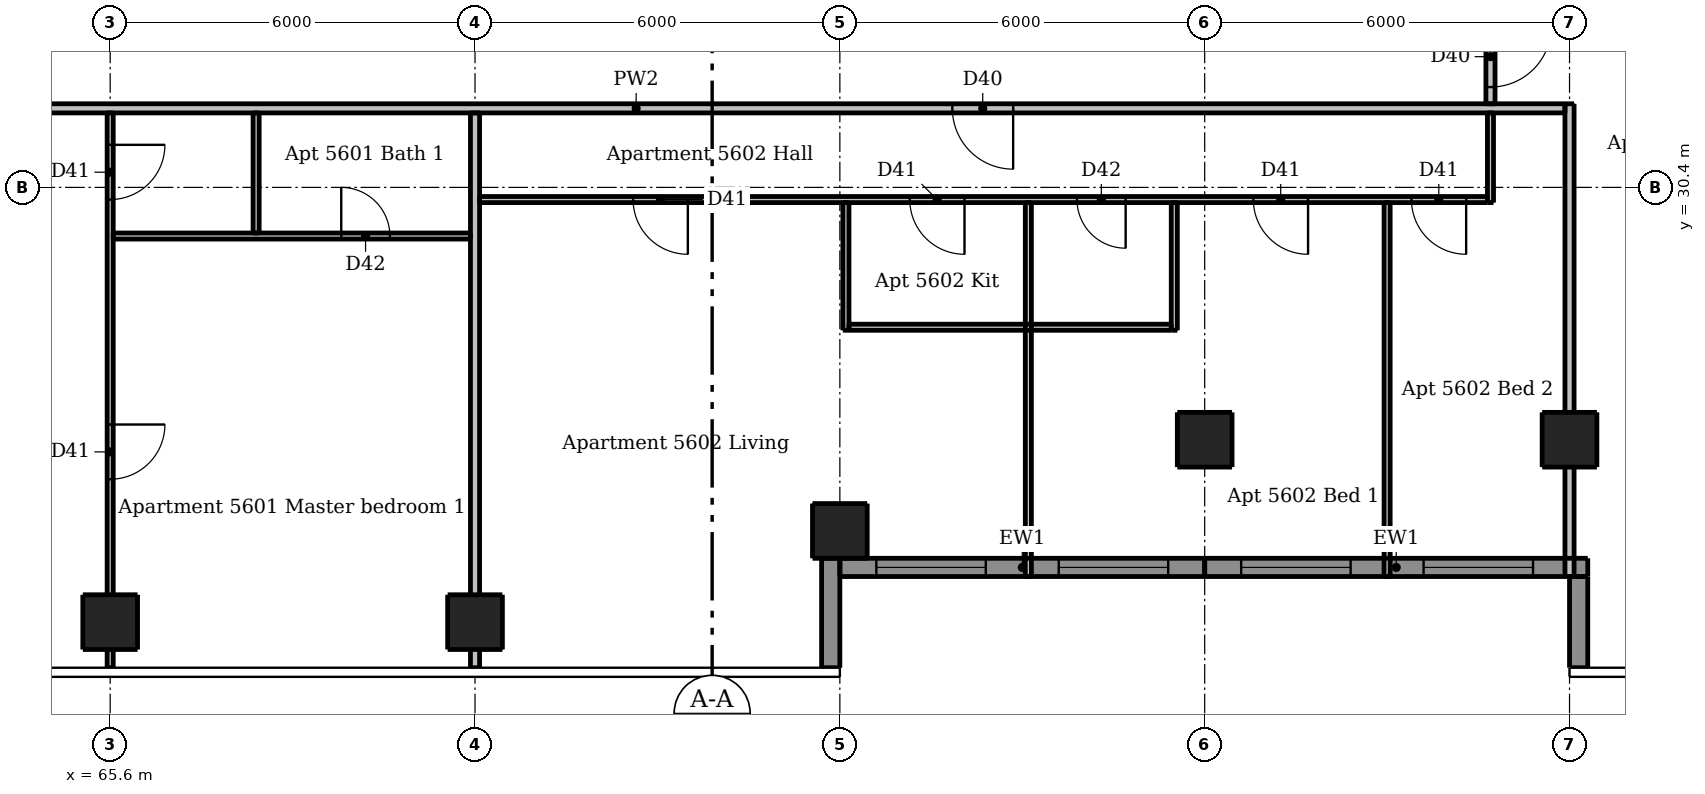
"""IFC4 building model, lengths in metres.
Left out: names, types, materials, properties, quantities, classifications, styles, units other than length and angle.
Written with IfcOpenShell. Run it as: python <this file> out.ifc"""

import sys

from ifc_helpers import new_model, si_unit, direction, frame, frame_2d, origin, origin_2d, place, context, subcontext, project, spatial, rectangle, extrude, element, fill, save


model = new_model("IFC4")
c1 = context("Model", 3, precision=1e-05, world=origin(), true_north=direction((0.0, 1.0)))
c2 = subcontext(c1, "Body", "Model", "MODEL_VIEW")
j1 = project(units=[si_unit("LENGTHUNIT", "METRE"), si_unit("PLANEANGLEUNIT", "RADIAN")], contexts=[c1])
p1 = place(None, origin())
s1 = spatial("IfcSite", under=j1, at=p1, CompositionType="ELEMENT")
p2 = place(p1, origin())
s2 = spatial("IfcBuilding", under=s1, at=p2, CompositionType="ELEMENT")
p3 = place(p2, frame((0.0, 0.0, 210.1)))
s3 = spatial("IfcBuildingStorey", under=s2, at=p3, CompositionType="ELEMENT", Elevation=210.1)
for number, where, z_axis, x_axis in (
    (1, (65.6, 23.25, 0.0), (0.0, 0.0, 1.0), (1.0, 0.0, 0.0)),
    (2, (71.6, 23.25, 0.0), (0.0, 0.0, 1.0), (1.0, 0.0, 0.0)),
    (3, (77.6, 24.75, 0.0), (0.0, 0.0, 1.0), (1.0, 0.0, 0.0)),
    (4, (83.6, 26.25, 0.0), (0.0, 0.0, 1.0), (1.0, 0.0, 0.0)),
    (5, (89.6, 26.25, 0.0), (0.0, 0.0, 1.0), (1.0, 0.0, 0.0)),
):
    element("IfcColumn", number, at=place(p3, frame(where, z_axis=z_axis, x_axis=x_axis)), inside=s3, PredefinedType="COLUMN", context=c2, shape_type="SweptSolid", body=[
        extrude(rectangle(XDim=0.9, YDim=0.9, at=origin_2d()), origin(), (0.0, 0.0, 1.0), 3.05),
    ])
p4 = place(p3, frame((77.45, 22.5, 0.0), z_axis=(0.0, 0.0, 1.0), x_axis=(0.0, 1.0, 0.0)))
e6 = element("IfcWall", 6, at=p4, inside=s3, PredefinedType="SOLIDWALL", context=c2, shape_type="SweptSolid", body=[
    extrude(rectangle(XDim=1.8, YDim=0.3, at=frame_2d((0.9, 0.0))), origin(), (0.0, 0.0, 1.0), 3.05),
])
p5 = place(p3, frame((89.75, 24.0, 0.0), z_axis=(0.0, 0.0, 1.0), x_axis=(0.0, -1.0, 0.0)))
e7 = element("IfcWall", 7, at=p5, inside=s3, PredefinedType="SOLIDWALL", context=c2, shape_type="SweptSolid", body=[
    extrude(rectangle(XDim=1.5, YDim=0.3, at=frame_2d((0.75, 0.0))), origin(), (0.0, 0.0, 1.0), 3.05),
])
p6 = place(p3, frame((77.6, 24.15, 0.0), z_axis=(0.0, 0.0, 1.0), x_axis=(1.0, 0.0, 0.0)))
e8 = element("IfcWall", 8, at=p6, inside=s3, PredefinedType="SOLIDWALL", context=c2, shape_type="SweptSolid", body=[
    extrude(rectangle(XDim=6.0, YDim=0.3, at=frame_2d((3.0, 0.0))), origin(), (0.0, 0.0, 1.0), 3.05),
])
p7 = place(p6, frame((0.6, 0.0, 0.15)))
e9 = element("IfcOpeningElement", 9, at=p7, cuts=e8, PredefinedType="OPENING", context=c2, shape_type="SweptSolid", body=[
    extrude(rectangle(XDim=1.8, YDim=2.1, at=frame_2d((0.9, 1.05))), frame((0.0, 0.16, 0.0), z_axis=(0.0, -1.0, 0.0), x_axis=(1.0, 0.0, 0.0)), (0.0, 0.0, 1.0), 0.32),
])
p8 = place(p6, frame((3.6, 0.0, 0.15)))
e10 = element("IfcOpeningElement", 10, at=p8, cuts=e8, PredefinedType="OPENING", context=c2, shape_type="SweptSolid", body=[
    extrude(rectangle(XDim=1.8, YDim=2.1, at=frame_2d((0.9, 1.05))), frame((0.0, 0.16, 0.0), z_axis=(0.0, -1.0, 0.0), x_axis=(1.0, 0.0, 0.0)), (0.0, 0.0, 1.0), 0.32),
])
p9 = place(p3, frame((83.6, 24.15, 0.0), z_axis=(0.0, 0.0, 1.0), x_axis=(1.0, 0.0, 0.0)))
e11 = element("IfcWall", 11, at=p9, inside=s3, PredefinedType="SOLIDWALL", context=c2, shape_type="SweptSolid", body=[
    extrude(rectangle(XDim=6.3, YDim=0.3, at=frame_2d((3.15, 0.0))), origin(), (0.0, 0.0, 1.0), 3.05),
])
p10 = place(p9, frame((0.6, 0.0, 0.15)))
e12 = element("IfcOpeningElement", 12, at=p10, cuts=e11, PredefinedType="OPENING", context=c2, shape_type="SweptSolid", body=[
    extrude(rectangle(XDim=1.8, YDim=2.1, at=frame_2d((0.9, 1.05))), frame((0.0, 0.16, 0.0), z_axis=(0.0, -1.0, 0.0), x_axis=(1.0, 0.0, 0.0)), (0.0, 0.0, 1.0), 0.32),
])
p11 = place(p9, frame((3.6, 0.0, 0.15)))
e13 = element("IfcOpeningElement", 13, at=p11, cuts=e11, PredefinedType="OPENING", context=c2, shape_type="SweptSolid", body=[
    extrude(rectangle(XDim=1.8, YDim=2.1, at=frame_2d((0.9, 1.05))), frame((0.0, 0.16, 0.0), z_axis=(0.0, -1.0, 0.0), x_axis=(1.0, 0.0, 0.0)), (0.0, 0.0, 1.0), 0.32),
])
p12 = place(p3, frame((65.6, 31.625, 0.0), z_axis=(0.0, 0.0, 1.0), x_axis=(0.0, -1.0, 0.0)))
e14 = element("IfcWall", 14, at=p12, inside=s3, PredefinedType="PARTITIONING", context=c2, shape_type="SweptSolid", body=[
    extrude(rectangle(XDim=9.125, YDim=0.1, at=frame_2d((4.562, 0.0))), origin(), (0.0, 0.0, 1.0), 2.516),
])
p13 = place(p12, frame((0.525, 0.0, 0.0)))
e15 = element("IfcOpeningElement", 15, at=p13, cuts=e14, PredefinedType="OPENING", context=c2, shape_type="SweptSolid", body=[
    extrude(rectangle(XDim=0.9, YDim=2.1, at=frame_2d((0.45, 1.05))), frame((0.0, 0.06, 0.0), z_axis=(0.0, -1.0, 0.0), x_axis=(1.0, 0.0, 0.0)), (0.0, 0.0, 1.0), 0.12),
])
p14 = place(p12, frame((5.125, 0.0, 0.0)))
e16 = element("IfcOpeningElement", 16, at=p14, cuts=e14, PredefinedType="OPENING", context=c2, shape_type="SweptSolid", body=[
    extrude(rectangle(XDim=0.9, YDim=2.1, at=frame_2d((0.45, 1.05))), frame((0.0, 0.06, 0.0), z_axis=(0.0, -1.0, 0.0), x_axis=(1.0, 0.0, 0.0)), (0.0, 0.0, 1.0), 0.12),
])
p15 = place(p3, frame((68.0, 29.65, 0.0), z_axis=(0.0, 0.0, 1.0), x_axis=(0.0, 1.0, 0.0)))
e17 = element("IfcWall", 17, at=p15, inside=s3, PredefinedType="PARTITIONING", context=c2, shape_type="SweptSolid", body=[
    extrude(rectangle(XDim=1.975, YDim=0.1, at=frame_2d((0.988, 0.0))), origin(), (0.0, 0.0, 1.0), 3.05),
])
p16 = place(p3, frame((77.7, 28.05, 0.0), z_axis=(0.0, 0.0, 1.0), x_axis=(0.0, 1.0, 0.0)))
e18 = element("IfcWall", 18, at=p16, inside=s3, PredefinedType="PARTITIONING", context=c2, shape_type="SweptSolid", body=[
    extrude(rectangle(XDim=2.1, YDim=0.1, at=frame_2d((1.05, 0.0))), origin(), (0.0, 0.0, 1.0), 2.59),
])
p17 = place(p3, frame((80.7, 24.0, 0.0), z_axis=(0.0, 0.0, 1.0), x_axis=(0.0, 1.0, 0.0)))
e19 = element("IfcWall", 19, at=p17, inside=s3, PredefinedType="PARTITIONING", context=c2, shape_type="SweptSolid", body=[
    extrude(rectangle(XDim=6.15, YDim=0.1, at=frame_2d((3.075, 0.0))), origin(), (0.0, 0.0, 1.0), 3.05),
])
p18 = place(p3, frame((83.1, 28.05, 0.0), z_axis=(0.0, 0.0, 1.0), x_axis=(0.0, 1.0, 0.0)))
e20 = element("IfcWall", 20, at=p18, inside=s3, PredefinedType="PARTITIONING", context=c2, shape_type="SweptSolid", body=[
    extrude(rectangle(XDim=2.1, YDim=0.1, at=frame_2d((1.05, 0.0))), origin(), (0.0, 0.0, 1.0), 3.05),
])
p19 = place(p3, frame((86.6, 24.0, 0.0), z_axis=(0.0, 0.0, 1.0), x_axis=(0.0, 1.0, 0.0)))
e21 = element("IfcWall", 21, at=p19, inside=s3, PredefinedType="PARTITIONING", context=c2, shape_type="SweptSolid", body=[
    extrude(rectangle(XDim=6.15, YDim=0.1, at=frame_2d((3.075, 0.0))), origin(), (0.0, 0.0, 1.0), 3.05),
])
p20 = place(p3, frame((88.3, 30.15, 0.0), z_axis=(0.0, 0.0, 1.0), x_axis=(0.0, 1.0, 0.0)))
e22 = element("IfcWall", 22, at=p20, inside=s3, PredefinedType="PARTITIONING", context=c2, shape_type="SweptSolid", body=[
    extrude(rectangle(XDim=1.475, YDim=0.1, at=frame_2d((0.738, 0.0))), origin(), (0.0, 0.0, 1.0), 3.05),
])
p21 = place(p3, frame((88.25, 30.2, 0.0), z_axis=(0.0, 0.0, 1.0), x_axis=(-1.0, 0.0, 0.0)))
e23 = element("IfcWall", 23, at=p21, inside=s3, PredefinedType="PARTITIONING", context=c2, shape_type="SweptSolid", body=[
    extrude(rectangle(XDim=16.575, YDim=0.1, at=frame_2d((8.288, 0.0))), origin(), (0.0, 0.0, 1.0), 3.05),
])
p22 = place(p21, frame((13.15, 0.0, 0.0)))
e24 = element("IfcOpeningElement", 24, at=p22, cuts=e23, PredefinedType="OPENING", context=c2, shape_type="SweptSolid", body=[
    extrude(rectangle(XDim=0.9, YDim=2.1, at=frame_2d((0.45, 1.05))), frame((0.0, 0.06, 0.0), z_axis=(0.0, -1.0, 0.0), x_axis=(1.0, 0.0, 0.0)), (0.0, 0.0, 1.0), 0.12),
])
p23 = place(p21, frame((8.6, 0.0, 0.0)))
e25 = element("IfcOpeningElement", 25, at=p23, cuts=e23, PredefinedType="OPENING", context=c2, shape_type="SweptSolid", body=[
    extrude(rectangle(XDim=0.9, YDim=2.1, at=frame_2d((0.45, 1.05))), frame((0.0, 0.06, 0.0), z_axis=(0.0, -1.0, 0.0), x_axis=(1.0, 0.0, 0.0)), (0.0, 0.0, 1.0), 0.12),
])
p24 = place(p21, frame((2.95, 0.0, 0.0)))
e26 = element("IfcOpeningElement", 26, at=p24, cuts=e23, PredefinedType="OPENING", context=c2, shape_type="SweptSolid", body=[
    extrude(rectangle(XDim=0.9, YDim=2.1, at=frame_2d((0.45, 1.05))), frame((0.0, 0.06, 0.0), z_axis=(0.0, -1.0, 0.0), x_axis=(1.0, 0.0, 0.0)), (0.0, 0.0, 1.0), 0.12),
])
p25 = place(p21, frame((0.35, 0.0, 0.0)))
e27 = element("IfcOpeningElement", 27, at=p25, cuts=e23, PredefinedType="OPENING", context=c2, shape_type="SweptSolid", body=[
    extrude(rectangle(XDim=0.9, YDim=2.1, at=frame_2d((0.45, 1.05))), frame((0.0, 0.06, 0.0), z_axis=(0.0, -1.0, 0.0), x_axis=(1.0, 0.0, 0.0)), (0.0, 0.0, 1.0), 0.12),
])
p26 = place(p21, frame((5.95, 0.0, 0.0)))
e28 = element("IfcOpeningElement", 28, at=p26, cuts=e23, PredefinedType="OPENING", context=c2, shape_type="SweptSolid", body=[
    extrude(rectangle(XDim=0.8, YDim=2.1, at=frame_2d((0.4, 1.05))), frame((0.0, 0.06, 0.0), z_axis=(0.0, -1.0, 0.0), x_axis=(1.0, 0.0, 0.0)), (0.0, 0.0, 1.0), 0.12),
])
p27 = place(p3, frame((65.65, 29.6, 0.0), z_axis=(0.0, 0.0, 1.0), x_axis=(1.0, 0.0, 0.0)))
e29 = element("IfcWall", 29, at=p27, inside=s3, PredefinedType="PARTITIONING", context=c2, shape_type="SweptSolid", body=[
    extrude(rectangle(XDim=5.875, YDim=0.1, at=frame_2d((2.938, 0.0))), origin(), (0.0, 0.0, 1.0), 3.05),
])
p28 = place(p27, frame((3.75, 0.0, 0.0)))
e30 = element("IfcOpeningElement", 30, at=p28, cuts=e29, PredefinedType="OPENING", context=c2, shape_type="SweptSolid", body=[
    extrude(rectangle(XDim=0.8, YDim=2.1, at=frame_2d((0.4, 1.05))), frame((0.0, 0.06, 0.0), z_axis=(0.0, -1.0, 0.0), x_axis=(1.0, 0.0, 0.0)), (0.0, 0.0, 1.0), 0.12),
])
p29 = place(p3, frame((77.75, 28.1, 0.0), z_axis=(0.0, 0.0, 1.0), x_axis=(1.0, 0.0, 0.0)))
e31 = element("IfcWall", 31, at=p29, inside=s3, PredefinedType="PARTITIONING", context=c2, shape_type="SweptSolid", body=[
    extrude(rectangle(XDim=5.3, YDim=0.1, at=frame_2d((2.65, 0.0))), origin(), (0.0, 0.0, 1.0), 3.05),
])
p30 = place(p3, frame((71.6, 22.5, 0.0), z_axis=(0.0, 0.0, 1.0), x_axis=(0.0, 1.0, 0.0)))
e32 = element("IfcWall", 32, at=p30, inside=s3, PredefinedType="PARTITIONING", context=c2, shape_type="SweptSolid", body=[
    extrude(rectangle(XDim=9.125, YDim=0.15, at=frame_2d((4.562, 0.0))), origin(), (0.0, 0.0, 1.0), 2.516),
])
p31 = place(p3, frame((88.3, 61.175, 0.0), z_axis=(0.0, 0.0, 1.0), x_axis=(0.0, -1.0, 0.0)))
e33 = element("IfcWall", 33, at=p31, inside=s3, PredefinedType="PARTITIONING", context=c2, shape_type="SweptSolid", body=[
    extrude(rectangle(XDim=29.4, YDim=0.15, at=frame_2d((14.7, 0.0))), origin(), (0.0, 0.0, 1.0), 3.05),
])
p32 = place(p31, frame((28.125, 0.0, 0.0)))
e34 = element("IfcOpeningElement", 34, at=p32, cuts=e33, PredefinedType="OPENING", context=c2, shape_type="SweptSolid", body=[
    extrude(rectangle(XDim=1.0, YDim=2.1, at=frame_2d((0.5, 1.05))), frame((0.0, 0.085, 0.0), z_axis=(0.0, -1.0, 0.0), x_axis=(1.0, 0.0, 0.0)), (0.0, 0.0, 1.0), 0.17),
])
p33 = place(p31, frame((10.775, 0.0, 0.0)))
e35 = element("IfcOpeningElement", 35, at=p33, cuts=e33, PredefinedType="OPENING", context=c2, shape_type="SweptSolid", body=[
    extrude(rectangle(XDim=1.0, YDim=2.1, at=frame_2d((0.5, 1.05))), frame((0.0, 0.085, 0.0), z_axis=(0.0, -1.0, 0.0), x_axis=(1.0, 0.0, 0.0)), (0.0, 0.0, 1.0), 0.17),
])
p34 = place(p3, frame((89.6, 24.0, 0.0), z_axis=(0.0, 0.0, 1.0), x_axis=(0.0, 1.0, 0.0)))
e36 = element("IfcWall", 36, at=p34, inside=s3, PredefinedType="PARTITIONING", context=c2, shape_type="SweptSolid", body=[
    extrude(rectangle(XDim=7.775, YDim=0.15, at=frame_2d((3.887, 0.0))), origin(), (0.0, 0.0, 1.0), 2.516),
])
p35 = place(p3, frame((89.525, 31.7, 0.0), z_axis=(0.0, 0.0, 1.0), x_axis=(-1.0, 0.0, 0.0)))
e37 = element("IfcWall", 37, at=p35, inside=s3, PredefinedType="PARTITIONING", context=c2, shape_type="SweptSolid", body=[
    extrude(rectangle(XDim=30.55, YDim=0.15, at=frame_2d((15.275, 0.0))), origin(), (0.0, 0.0, 1.0), 3.05),
])
p36 = place(p35, frame((26.775, 0.0, 0.0)))
e38 = element("IfcOpeningElement", 38, at=p36, cuts=e37, PredefinedType="OPENING", context=c2, shape_type="SweptSolid", body=[
    extrude(rectangle(XDim=1.0, YDim=2.1, at=frame_2d((0.5, 1.05))), frame((0.0, 0.085, 0.0), z_axis=(0.0, -1.0, 0.0), x_axis=(1.0, 0.0, 0.0)), (0.0, 0.0, 1.0), 0.17),
])
p37 = place(p35, frame((9.075, 0.0, 0.0)))
e39 = element("IfcOpeningElement", 39, at=p37, cuts=e37, PredefinedType="OPENING", context=c2, shape_type="SweptSolid", body=[
    extrude(rectangle(XDim=1.0, YDim=2.1, at=frame_2d((0.5, 1.05))), frame((0.0, 0.085, 0.0), z_axis=(0.0, -1.0, 0.0), x_axis=(1.0, 0.0, 0.0)), (0.0, 0.0, 1.0), 0.17),
])
p38 = place(p7, origin())
e40 = element("IfcWindow", 40, at=p38, inside=s3, PartitioningType="DOUBLE_PANEL_VERTICAL", PredefinedType="WINDOW", context=c2, shape_type="SweptSolid", body=[
    extrude(rectangle(XDim=1.8, YDim=2.1, at=frame_2d((0.9, 1.05))), frame((0.0, 0.03, 0.0), z_axis=(0.0, -1.0, 0.0), x_axis=(1.0, 0.0, 0.0)), (0.0, 0.0, 1.0), 0.06),
])
fill(e9, e40)
p39 = place(p8, origin())
e41 = element("IfcWindow", 41, at=p39, inside=s3, PartitioningType="DOUBLE_PANEL_VERTICAL", PredefinedType="WINDOW", context=c2, shape_type="SweptSolid", body=[
    extrude(rectangle(XDim=1.8, YDim=2.1, at=frame_2d((0.9, 1.05))), frame((0.0, 0.03, 0.0), z_axis=(0.0, -1.0, 0.0), x_axis=(1.0, 0.0, 0.0)), (0.0, 0.0, 1.0), 0.06),
])
fill(e10, e41)
p40 = place(p10, origin())
e42 = element("IfcWindow", 42, at=p40, inside=s3, PartitioningType="DOUBLE_PANEL_VERTICAL", PredefinedType="WINDOW", context=c2, shape_type="SweptSolid", body=[
    extrude(rectangle(XDim=1.8, YDim=2.1, at=frame_2d((0.9, 1.05))), frame((0.0, 0.03, 0.0), z_axis=(0.0, -1.0, 0.0), x_axis=(1.0, 0.0, 0.0)), (0.0, 0.0, 1.0), 0.06),
])
fill(e12, e42)
p41 = place(p11, origin())
e43 = element("IfcWindow", 43, at=p41, inside=s3, PartitioningType="DOUBLE_PANEL_VERTICAL", PredefinedType="WINDOW", context=c2, shape_type="SweptSolid", body=[
    extrude(rectangle(XDim=1.8, YDim=2.1, at=frame_2d((0.9, 1.05))), frame((0.0, 0.03, 0.0), z_axis=(0.0, -1.0, 0.0), x_axis=(1.0, 0.0, 0.0)), (0.0, 0.0, 1.0), 0.06),
])
fill(e13, e43)
p42 = place(p13, origin())
e44 = element("IfcDoor", 44, at=p42, inside=s3, OperationType="SINGLE_SWING_LEFT", PredefinedType="DOOR", context=c2, shape_type="SweptSolid", body=[
    extrude(rectangle(XDim=0.9, YDim=2.1, at=frame_2d((0.45, 1.05))), frame((0.0, 0.025, 0.0), z_axis=(0.0, -1.0, 0.0), x_axis=(1.0, 0.0, 0.0)), (0.0, 0.0, 1.0), 0.05),
])
fill(e15, e44)
p43 = place(p14, origin())
e45 = element("IfcDoor", 45, at=p43, inside=s3, OperationType="SINGLE_SWING_LEFT", PredefinedType="DOOR", context=c2, shape_type="SweptSolid", body=[
    extrude(rectangle(XDim=0.9, YDim=2.1, at=frame_2d((0.45, 1.05))), frame((0.0, 0.025, 0.0), z_axis=(0.0, -1.0, 0.0), x_axis=(1.0, 0.0, 0.0)), (0.0, 0.0, 1.0), 0.05),
])
fill(e16, e45)
p44 = place(p28, origin())
e46 = element("IfcDoor", 46, at=p44, inside=s3, OperationType="SINGLE_SWING_LEFT", PredefinedType="DOOR", context=c2, shape_type="SweptSolid", body=[
    extrude(rectangle(XDim=0.8, YDim=2.1, at=frame_2d((0.4, 1.05))), frame((0.0, 0.025, 0.0), z_axis=(0.0, -1.0, 0.0), x_axis=(1.0, 0.0, 0.0)), (0.0, 0.0, 1.0), 0.05),
])
fill(e30, e46)
p45 = place(p37, origin())
e47 = element("IfcDoor", 47, at=p45, inside=s3, OperationType="SINGLE_SWING_LEFT", PredefinedType="DOOR", context=c2, shape_type="SweptSolid", body=[
    extrude(rectangle(XDim=1.0, YDim=2.1, at=frame_2d((0.5, 1.05))), frame((0.0, 0.025, 0.0), z_axis=(0.0, -1.0, 0.0), x_axis=(1.0, 0.0, 0.0)), (0.0, 0.0, 1.0), 0.05),
])
fill(e39, e47)
p46 = place(p22, origin())
e48 = element("IfcDoor", 48, at=p46, inside=s3, OperationType="SINGLE_SWING_LEFT", PredefinedType="DOOR", context=c2, shape_type="SweptSolid", body=[
    extrude(rectangle(XDim=0.9, YDim=2.1, at=frame_2d((0.45, 1.05))), frame((0.0, 0.025, 0.0), z_axis=(0.0, -1.0, 0.0), x_axis=(1.0, 0.0, 0.0)), (0.0, 0.0, 1.0), 0.05),
])
fill(e24, e48)
p47 = place(p23, origin())
e49 = element("IfcDoor", 49, at=p47, inside=s3, OperationType="SINGLE_SWING_LEFT", PredefinedType="DOOR", context=c2, shape_type="SweptSolid", body=[
    extrude(rectangle(XDim=0.9, YDim=2.1, at=frame_2d((0.45, 1.05))), frame((0.0, 0.025, 0.0), z_axis=(0.0, -1.0, 0.0), x_axis=(1.0, 0.0, 0.0)), (0.0, 0.0, 1.0), 0.05),
])
fill(e25, e49)
p48 = place(p24, origin())
e50 = element("IfcDoor", 50, at=p48, inside=s3, OperationType="SINGLE_SWING_LEFT", PredefinedType="DOOR", context=c2, shape_type="SweptSolid", body=[
    extrude(rectangle(XDim=0.9, YDim=2.1, at=frame_2d((0.45, 1.05))), frame((0.0, 0.025, 0.0), z_axis=(0.0, -1.0, 0.0), x_axis=(1.0, 0.0, 0.0)), (0.0, 0.0, 1.0), 0.05),
])
fill(e26, e50)
p49 = place(p25, origin())
e51 = element("IfcDoor", 51, at=p49, inside=s3, OperationType="SINGLE_SWING_LEFT", PredefinedType="DOOR", context=c2, shape_type="SweptSolid", body=[
    extrude(rectangle(XDim=0.9, YDim=2.1, at=frame_2d((0.45, 1.05))), frame((0.0, 0.025, 0.0), z_axis=(0.0, -1.0, 0.0), x_axis=(1.0, 0.0, 0.0)), (0.0, 0.0, 1.0), 0.05),
])
fill(e27, e51)
p50 = place(p26, origin())
e52 = element("IfcDoor", 52, at=p50, inside=s3, OperationType="SINGLE_SWING_LEFT", PredefinedType="DOOR", context=c2, shape_type="SweptSolid", body=[
    extrude(rectangle(XDim=0.8, YDim=2.1, at=frame_2d((0.4, 1.05))), frame((0.0, 0.025, 0.0), z_axis=(0.0, -1.0, 0.0), x_axis=(1.0, 0.0, 0.0)), (0.0, 0.0, 1.0), 0.05),
])
fill(e28, e52)
p51 = place(p32, origin())
e53 = element("IfcDoor", 53, at=p51, inside=s3, OperationType="SINGLE_SWING_LEFT", PredefinedType="DOOR", context=c2, shape_type="SweptSolid", body=[
    extrude(rectangle(XDim=1.0, YDim=2.1, at=frame_2d((0.5, 1.05))), frame((0.0, 0.025, 0.0), z_axis=(0.0, -1.0, 0.0), x_axis=(1.0, 0.0, 0.0)), (0.0, 0.0, 1.0), 0.05),
])
fill(e34, e53)
save(model, sys.argv[1])
